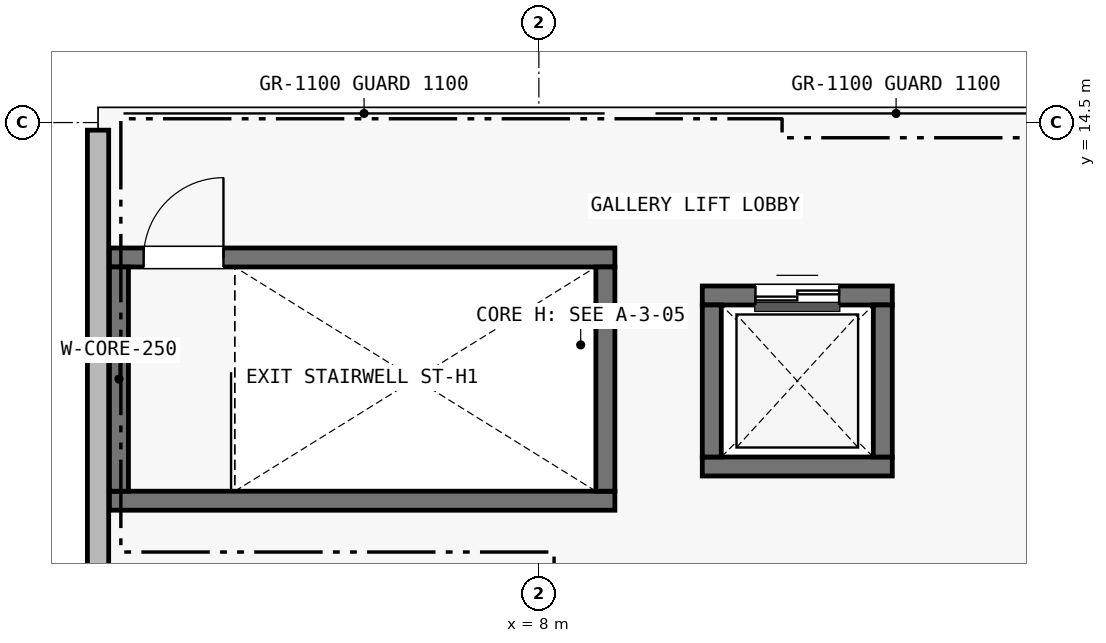
"""IFC4 building model, lengths in metres.
Left out: names, types, materials, properties, quantities, classifications, styles, units other than length and angle.
Written with IfcOpenShell. Run it as: python <this file> out.ifc"""

import sys

from ifc_helpers import new_model, si_unit, direction, frame, frame_2d, origin, place, context, subcontext, project, spatial, rectangle, extrude, element, fill, save


model = new_model("IFC4")
c1 = context("Model", 3, precision=1e-05, world=origin(), true_north=direction((0.0, 1.0)))
c2 = subcontext(c1, "Body", "Model", "MODEL_VIEW")
j1 = project(units=[si_unit("LENGTHUNIT", "METRE"), si_unit("PLANEANGLEUNIT", "RADIAN")], contexts=[c1])
p1 = place(None, origin())
s1 = spatial("IfcSite", under=j1, at=p1, CompositionType="ELEMENT")
p2 = place(p1, origin())
s2 = spatial("IfcBuilding", under=s1, at=p2, CompositionType="ELEMENT")
p3 = place(p2, frame((0.0, 0.0, 4.5)))
s3 = spatial("IfcBuildingStorey", under=s2, at=p3, CompositionType="ELEMENT", Elevation=4.5)
p4 = place(p3, frame((2.35, 12.725, 0.0), z_axis=(0.0, 0.0, 1.0), x_axis=(1.0, 0.0, 0.0)))
e1 = element("IfcWall", 1, at=p4, inside=s3, PredefinedType="SHEAR", context=c2, shape_type="SweptSolid", body=[
    extrude(rectangle(XDim=6.65, YDim=0.25, at=frame_2d((3.325, 0.0))), origin(), (0.0, 0.0, 1.0), 3.9),
])
p5 = place(p4, frame((0.45, 0.0, 0.0)))
e2 = element("IfcOpeningElement", 2, at=p5, cuts=e1, PredefinedType="OPENING", context=c2, shape_type="SweptSolid", body=[
    extrude(rectangle(XDim=1.05, YDim=2.15, at=frame_2d((0.525, 1.075))), frame((0.0, 0.14, 0.0), z_axis=(0.0, -1.0, 0.0), x_axis=(1.0, 0.0, 0.0)), (0.0, 0.0, 1.0), 0.28),
])
p6 = place(p3, frame((2.35, 9.525, 0.0), z_axis=(0.0, 0.0, 1.0), x_axis=(1.0, 0.0, 0.0)))
e3 = element("IfcWall", 3, at=p6, inside=s3, PredefinedType="SHEAR", context=c2, shape_type="SweptSolid", body=[
    extrude(rectangle(XDim=6.65, YDim=0.25, at=frame_2d((3.325, 0.0))), origin(), (0.0, 0.0, 1.0), 3.9),
])
for number, where, z_axis, x_axis in (
    (4, (2.475, 9.65, 0.0), (0.0, 0.0, 1.0), (0.0, 1.0, 0.0)),
    (5, (8.875, 9.65, 0.0), (0.0, 0.0, 1.0), (0.0, 1.0, 0.0)),
):
    element("IfcWall", number, at=place(p3, frame(where, z_axis=z_axis, x_axis=x_axis)), inside=s3, PredefinedType="SHEAR", context=c2, shape_type="SweptSolid", body=[
        extrude(rectangle(XDim=2.95, YDim=0.25, at=frame_2d((1.475, 0.0))), origin(), (0.0, 0.0, 1.0), 3.9),
    ])
p7 = place(p3, frame((10.15, 12.225, 0.0), z_axis=(0.0, 0.0, 1.0), x_axis=(1.0, 0.0, 0.0)))
e6 = element("IfcWall", 6, at=p7, inside=s3, PredefinedType="SHEAR", context=c2, shape_type="SweptSolid", body=[
    extrude(rectangle(XDim=2.5, YDim=0.25, at=frame_2d((1.25, 0.0))), origin(), (0.0, 0.0, 1.0), 3.9),
])
p8 = place(p7, frame((0.7, 0.0, 0.0)))
e7 = element("IfcOpeningElement", 7, at=p8, cuts=e6, PredefinedType="OPENING", context=c2, shape_type="SweptSolid", body=[
    extrude(rectangle(XDim=1.1, YDim=2.15, at=frame_2d((0.55, 1.075))), frame((0.0, 0.14, 0.0), z_axis=(0.0, -1.0, 0.0), x_axis=(1.0, 0.0, 0.0)), (0.0, 0.0, 1.0), 0.28),
])
p9 = place(p3, frame((10.15, 9.975, 0.0), z_axis=(0.0, 0.0, 1.0), x_axis=(1.0, 0.0, 0.0)))
e8 = element("IfcWall", 8, at=p9, inside=s3, PredefinedType="SHEAR", context=c2, shape_type="SweptSolid", body=[
    extrude(rectangle(XDim=2.5, YDim=0.25, at=frame_2d((1.25, 0.0))), origin(), (0.0, 0.0, 1.0), 3.9),
])
for number, where, z_axis, x_axis in (
    (9, (10.275, 10.1, 0.0), (0.0, 0.0, 1.0), (0.0, 1.0, 0.0)),
    (10, (12.525, 10.1, 0.0), (0.0, 0.0, 1.0), (0.0, 1.0, 0.0)),
):
    element("IfcWall", number, at=place(p3, frame(where, z_axis=z_axis, x_axis=x_axis)), inside=s3, PredefinedType="SHEAR", context=c2, shape_type="SweptSolid", body=[
        extrude(rectangle(XDim=2.0, YDim=0.25, at=frame_2d((1.0, 0.0))), origin(), (0.0, 0.0, 1.0), 3.9),
    ])
p10 = place(p3, frame((2.2, 7.9, 0.0), z_axis=(0.0, 0.0, 1.0), x_axis=(0.0, 1.0, 0.0)))
e11 = element("IfcWall", 11, at=p10, inside=s3, PredefinedType="SOLIDWALL", context=c2, shape_type="SweptSolid", body=[
    extrude(rectangle(XDim=6.5, YDim=0.28, at=frame_2d((3.25, 0.0))), origin(), (0.0, 0.0, 1.0), 2.86),
])
p11 = place(p2, origin())
s4 = spatial("IfcBuildingStorey", under=s2, at=p11, CompositionType="ELEMENT", Elevation=0.0)
p12 = place(p11, frame((2.2, 15.0, 0.0), z_axis=(0.0, 0.0, 1.0), x_axis=(0.0, 1.0, 0.0)))
e12 = element("IfcWall", 12, at=p12, inside=s4, PredefinedType="SOLIDWALL", context=c2, shape_type="SweptSolid", body=[
    extrude(rectangle(XDim=28.1, YDim=0.28, at=frame_2d((14.05, 0.0))), origin(), (0.0, 0.0, 1.0), 7.38),
])
p13 = place(p12, frame((8.0, 0.0, 0.0)))
e13 = element("IfcOpeningElement", 13, at=p13, cuts=e12, PredefinedType="OPENING", context=c2, shape_type="SweptSolid", body=[
    extrude(rectangle(XDim=3.8, YDim=2.85, at=frame_2d((1.9, 1.425))), frame((0.0, 0.155, 0.0), z_axis=(0.0, -1.0, 0.0), x_axis=(1.0, 0.0, 0.0)), (0.0, 0.0, 1.0), 0.31),
])
p14 = place(p12, frame((2.2, 0.0, 3.2)))
e14 = element("IfcOpeningElement", 14, at=p14, cuts=e12, PredefinedType="OPENING", context=c2, shape_type="SweptSolid", body=[
    extrude(rectangle(XDim=0.64, YDim=2.18, at=frame_2d((0.32, 1.09))), frame((0.0, 0.155, 0.0), z_axis=(0.0, -1.0, 0.0), x_axis=(1.0, 0.0, 0.0)), (0.0, 0.0, 1.0), 0.31),
])
p15 = place(p12, frame((5.2, 0.0, 3.2)))
e15 = element("IfcOpeningElement", 15, at=p15, cuts=e12, PredefinedType="OPENING", context=c2, shape_type="SweptSolid", body=[
    extrude(rectangle(XDim=0.7, YDim=2.36, at=frame_2d((0.35, 1.18))), frame((0.0, 0.155, 0.0), z_axis=(0.0, -1.0, 0.0), x_axis=(1.0, 0.0, 0.0)), (0.0, 0.0, 1.0), 0.31),
])
p16 = place(p12, frame((14.5, 0.0, 3.2)))
e16 = element("IfcOpeningElement", 16, at=p16, cuts=e12, PredefinedType="OPENING", context=c2, shape_type="SweptSolid", body=[
    extrude(rectangle(XDim=0.76, YDim=2.34, at=frame_2d((0.38, 1.17))), frame((0.0, 0.155, 0.0), z_axis=(0.0, -1.0, 0.0), x_axis=(1.0, 0.0, 0.0)), (0.0, 0.0, 1.0), 0.31),
])
p17 = place(p12, frame((19.0, 0.0, 3.2)))
e17 = element("IfcOpeningElement", 17, at=p17, cuts=e12, PredefinedType="OPENING", context=c2, shape_type="SweptSolid", body=[
    extrude(rectangle(XDim=0.82, YDim=2.18, at=frame_2d((0.41, 1.09))), frame((0.0, 0.155, 0.0), z_axis=(0.0, -1.0, 0.0), x_axis=(1.0, 0.0, 0.0)), (0.0, 0.0, 1.0), 0.31),
])
p18 = place(p12, frame((23.5, 0.0, 3.2)))
e18 = element("IfcOpeningElement", 18, at=p18, cuts=e12, PredefinedType="OPENING", context=c2, shape_type="SweptSolid", body=[
    extrude(rectangle(XDim=0.58, YDim=2.16, at=frame_2d((0.29, 1.08))), frame((0.0, 0.155, 0.0), z_axis=(0.0, -1.0, 0.0), x_axis=(1.0, 0.0, 0.0)), (0.0, 0.0, 1.0), 0.31),
])
p19 = place(p5, origin())
e19 = element("IfcDoor", 19, at=p19, inside=s3, OperationType="SINGLE_SWING_RIGHT", PredefinedType="DOOR", context=c2, shape_type="SweptSolid", body=[
    extrude(rectangle(XDim=1.05, YDim=2.15, at=frame_2d((0.525, 1.075))), frame((0.0, 0.025, 0.0), z_axis=(0.0, -1.0, 0.0), x_axis=(1.0, 0.0, 0.0)), (0.0, 0.0, 1.0), 0.05),
])
fill(e2, e19)
p20 = place(p8, origin())
e20 = element("IfcDoor", 20, at=p20, inside=s3, OperationType="DOUBLE_DOOR_SLIDING", PredefinedType="DOOR", context=c2, shape_type="SweptSolid", body=[
    extrude(rectangle(XDim=1.1, YDim=2.15, at=frame_2d((0.55, 1.075))), frame((0.0, 0.025, 0.0), z_axis=(0.0, -1.0, 0.0), x_axis=(1.0, 0.0, 0.0)), (0.0, 0.0, 1.0), 0.05),
])
fill(e7, e20)
save(model, sys.argv[1])
